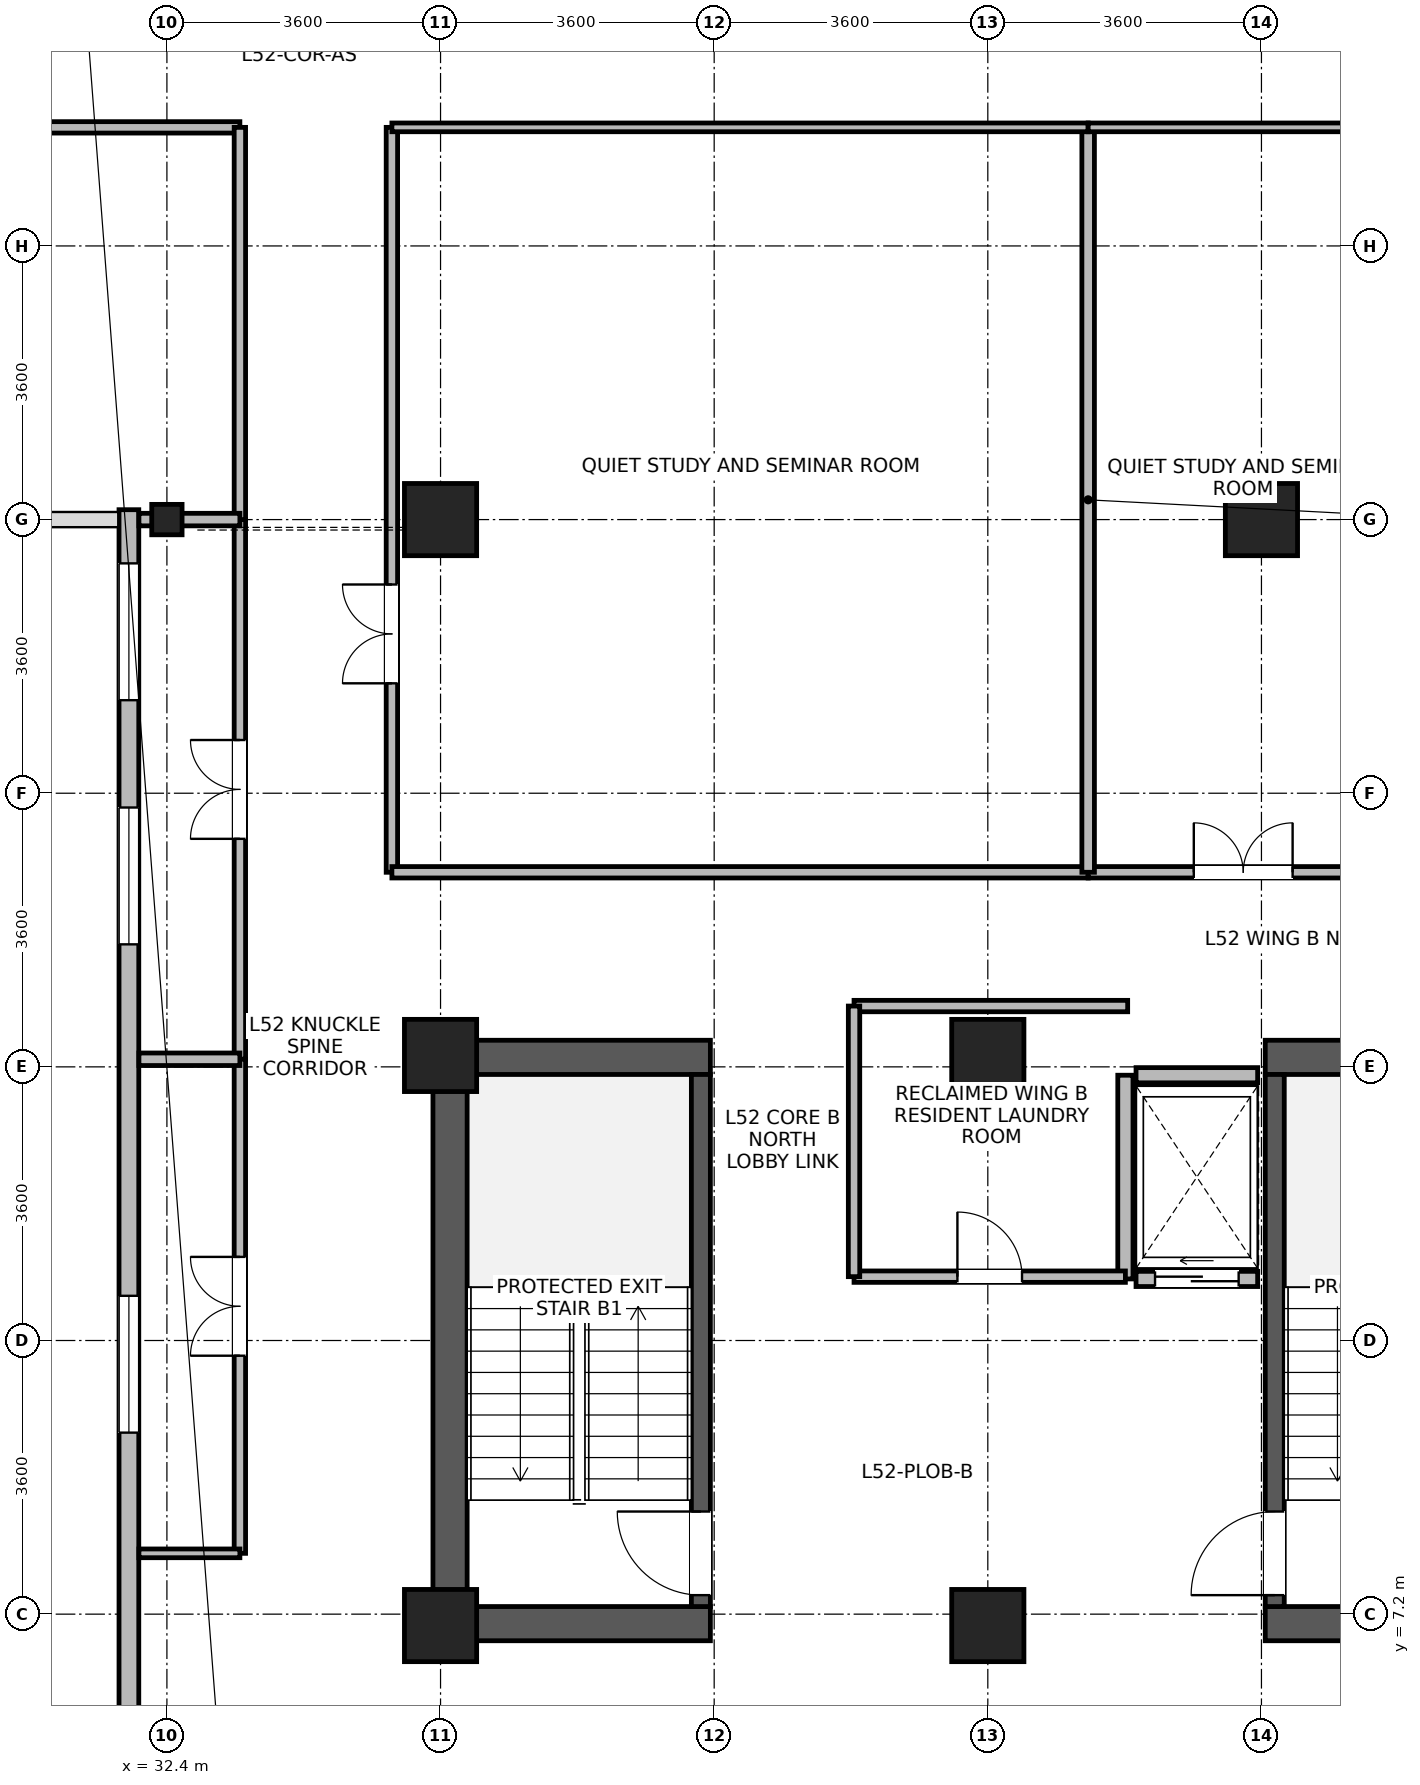
"""IFC4 building model, lengths in metres.
Left out: names, types, materials, properties, quantities, classifications, styles, units other than length and angle.
Written with IfcOpenShell. Run it as: python <this file> out.ifc"""

import sys

from ifc_helpers import new_model, si_unit, direction, frame, frame_2d, origin, origin_2d, place, context, subcontext, project, spatial, rectangle, i_section, extrude, source, transform, mapped, element, fill, save


model = new_model("IFC4")
c1 = context("Model", 3, precision=1e-05, world=origin(), true_north=direction((0.0, 1.0)))
c2 = subcontext(c1, "Body", "Model", "MODEL_VIEW")
j1 = project(units=[si_unit("LENGTHUNIT", "METRE"), si_unit("PLANEANGLEUNIT", "RADIAN")], contexts=[c1])
p1 = place(None, origin())
s1 = spatial("IfcSite", under=j1, at=p1, CompositionType="ELEMENT")
p2 = place(p1, origin())
s2 = spatial("IfcBuilding", under=s1, at=p2, CompositionType="ELEMENT")
p3 = place(p2, frame((0.0, 0.0, 205.5)))
s3 = spatial("IfcBuildingStorey", under=s2, at=p3, CompositionType="ELEMENT", Elevation=205.5)
p4 = place(p3, frame((36.125, 6.85, 0.0), z_axis=(0.0, 0.0, 1.0), x_axis=(0.0, 1.0, 0.0)))
e1 = element("IfcWall", 1, at=p4, inside=s3, PredefinedType="SHEAR", context=c2, shape_type="SweptSolid", body=[
    extrude(rectangle(XDim=7.9, YDim=0.45, at=frame_2d((3.95, 0.0))), origin(), (0.0, 0.0, 1.0), 3.47),
])
for number, where, z_axis, x_axis in (
    (2, (36.35, 7.075, 0.0), (0.0, 0.0, 1.0), (1.0, 0.0, 0.0)),
    (3, (46.85, 7.075, 0.0), (0.0, 0.0, 1.0), (1.0, 0.0, 0.0)),
    (4, (36.35, 14.525, 0.0), (0.0, 0.0, 1.0), (1.0, 0.0, 0.0)),
    (5, (46.85, 14.525, 0.0), (0.0, 0.0, 1.0), (1.0, 0.0, 0.0)),
):
    element("IfcWall", number, at=place(p3, frame(where, z_axis=z_axis, x_axis=x_axis)), inside=s3, PredefinedType="SHEAR", context=c2, shape_type="SweptSolid", body=[
        extrude(rectangle(XDim=3.2, YDim=0.45, at=frame_2d((1.6, 0.0))), origin(), (0.0, 0.0, 1.0), 3.47),
    ])
p5 = place(p3, frame((39.425, 7.3, 0.0), z_axis=(0.0, 0.0, 1.0), x_axis=(0.0, 1.0, 0.0)))
e6 = element("IfcWall", 6, at=p5, inside=s3, PredefinedType="SHEAR", context=c2, shape_type="SweptSolid", body=[
    extrude(rectangle(XDim=7.0, YDim=0.25, at=frame_2d((3.5, 0.0))), origin(), (0.0, 0.0, 1.0), 3.47),
])
p6 = place(p5, frame((0.15, 0.0, 0.0)))
e7 = element("IfcOpeningElement", 7, at=p6, cuts=e6, PredefinedType="OPENING", context=c2, shape_type="SweptSolid", body=[
    extrude(rectangle(XDim=1.1, YDim=2.08, at=frame_2d((0.55, 1.04))), frame((0.0, 0.135, 0.0), z_axis=(0.0, -1.0, 0.0), x_axis=(1.0, 0.0, 0.0)), (0.0, 0.0, 1.0), 0.27),
])
p7 = place(p3, frame((46.975, 7.3, 0.0), z_axis=(0.0, 0.0, 1.0), x_axis=(0.0, 1.0, 0.0)))
e8 = element("IfcWall", 8, at=p7, inside=s3, PredefinedType="SHEAR", context=c2, shape_type="SweptSolid", body=[
    extrude(rectangle(XDim=7.0, YDim=0.25, at=frame_2d((3.5, 0.0))), origin(), (0.0, 0.0, 1.0), 3.47),
])
p8 = place(p7, frame((0.15, 0.0, 0.0)))
e9 = element("IfcOpeningElement", 9, at=p8, cuts=e8, PredefinedType="OPENING", context=c2, shape_type="SweptSolid", body=[
    extrude(rectangle(XDim=1.1, YDim=2.08, at=frame_2d((0.55, 1.04))), frame((0.0, 0.135, 0.0), z_axis=(0.0, -1.0, 0.0), x_axis=(1.0, 0.0, 0.0)), (0.0, 0.0, 1.0), 0.27),
])
m1 = source(origin(), c2, "Body", "SweptSolid", [
    extrude(rectangle(XDim=0.95, YDim=0.95, at=origin_2d()), origin(), (0.0, 0.0, 1.0), 3.7),
])
for number, where, z_axis, x_axis in (
    (10, (36.0, 21.6, 0.0), (0.0, 0.0, 1.0), (1.0, 0.0, 0.0)),
    (11, (46.8, 21.6, 0.0), (0.0, 0.0, 1.0), (1.0, 0.0, 0.0)),
    (12, (36.0, 7.05, 0.0), (0.0, 0.0, 1.0), (1.0, 0.0, 0.0)),
    (13, (36.0, 14.55, 0.0), (0.0, 0.0, 1.0), (1.0, 0.0, 0.0)),
    (14, (43.2, 7.05, 0.0), (0.0, 0.0, 1.0), (1.0, 0.0, 0.0)),
    (15, (43.2, 14.55, 0.0), (0.0, 0.0, 1.0), (1.0, 0.0, 0.0)),
):
    element("IfcColumn", number, at=place(p3, frame(where, z_axis=z_axis, x_axis=x_axis)), inside=s3, PredefinedType="COLUMN", context=c2, shape_type="MappedRepresentation", body=[
        mapped(m1, transform((0.0, 0.0, 0.0), x_axis=(1.0, 0.0, 0.0), y_axis=(0.0, 1.0, 0.0), z_axis=(0.0, 0.0, 1.0), scale=1.0)),
    ])
m2 = source(origin(), c2, "Body", "SweptSolid", [
    extrude(i_section(OverallWidth=0.399, OverallDepth=0.4, WebThickness=0.017, FlangeThickness=0.023, FilletRadius=0.015, at=origin_2d()), origin(), (0.0, 0.0, 1.0), 3.7),
])
p9 = place(p3, frame((32.4, 21.6, 0.0), z_axis=(0.0, 0.0, 1.0), x_axis=(1.0, 0.0, 0.0)))
e16 = element("IfcColumn", 16, at=p9, inside=s3, PredefinedType="COLUMN", context=c2, shape_type="MappedRepresentation", body=[
    mapped(m2, transform((0.0, 0.0, 0.0), x_axis=(1.0, 0.0, 0.0), y_axis=(0.0, 1.0, 0.0), z_axis=(0.0, 0.0, 1.0), scale=1.0)),
])
p10 = place(p3, frame((31.9, 5.67, 0.0), z_axis=(0.0, 0.0, 1.0), x_axis=(0.0, 1.0, 0.0)))
e17 = element("IfcWall", 17, at=p10, inside=s3, PredefinedType="STANDARD", context=c2, shape_type="SweptSolid", body=[
    extrude(rectangle(XDim=16.06, YDim=0.26, at=frame_2d((8.03, 0.0))), origin(), (0.0, 0.0, 1.0), 3.45),
])
p11 = place(p10, frame((3.918, 0.0, 0.85)))
e18 = element("IfcOpeningElement", 18, at=p11, cuts=e17, PredefinedType="OPENING", context=c2, shape_type="SweptSolid", body=[
    extrude(rectangle(XDim=1.8, YDim=1.85, at=frame_2d((0.9, 0.925))), frame((0.0, 0.14, 0.0), z_axis=(0.0, -1.0, 0.0), x_axis=(1.0, 0.0, 0.0)), (0.0, 0.0, 1.0), 0.28),
])
p12 = place(p10, frame((10.342, 0.0, 0.85)))
e19 = element("IfcOpeningElement", 19, at=p12, cuts=e17, PredefinedType="OPENING", context=c2, shape_type="SweptSolid", body=[
    extrude(rectangle(XDim=1.8, YDim=1.85, at=frame_2d((0.9, 0.925))), frame((0.0, 0.14, 0.0), z_axis=(0.0, -1.0, 0.0), x_axis=(1.0, 0.0, 0.0)), (0.0, 0.0, 1.0), 0.28),
])
p13 = place(p10, frame((13.554, 0.0, 0.85)))
e20 = element("IfcOpeningElement", 20, at=p13, cuts=e17, PredefinedType="OPENING", context=c2, shape_type="SweptSolid", body=[
    extrude(rectangle(XDim=1.8, YDim=1.85, at=frame_2d((0.9, 0.925))), frame((0.0, 0.14, 0.0), z_axis=(0.0, -1.0, 0.0), x_axis=(1.0, 0.0, 0.0)), (0.0, 0.0, 1.0), 0.28),
])
p14 = place(p3, frame((45.15, 11.61, 0.0), z_axis=(0.0, 0.0, 1.0), x_axis=(1.0, 0.0, 0.0)))
e21 = element("IfcWall", 21, at=p14, inside=s3, PredefinedType="PARTITIONING", context=c2, shape_type="SweptSolid", body=[
    extrude(rectangle(XDim=1.6, YDim=0.2, at=frame_2d((0.8, 0.0))), origin(), (0.0, 0.0, 1.0), 3.45),
])
p15 = place(p14, frame((0.25, 0.0, 0.0)))
e22 = element("IfcOpeningElement", 22, at=p15, cuts=e21, PredefinedType="OPENING", context=c2, shape_type="SweptSolid", body=[
    extrude(rectangle(XDim=1.1, YDim=2.12, at=frame_2d((0.55, 1.06))), frame((0.0, 0.11, 0.0), z_axis=(0.0, -1.0, 0.0), x_axis=(1.0, 0.0, 0.0)), (0.0, 0.0, 1.0), 0.22),
])
p16 = place(p3, frame((45.15, 14.29, 0.0), z_axis=(0.0, 0.0, 1.0), x_axis=(1.0, 0.0, 0.0)))
e23 = element("IfcWall", 23, at=p16, inside=s3, PredefinedType="PARTITIONING", context=c2, shape_type="SweptSolid", body=[
    extrude(rectangle(XDim=1.6, YDim=0.2, at=frame_2d((0.8, 0.0))), origin(), (0.0, 0.0, 1.0), 2.45),
])
p17 = place(p3, frame((45.01, 11.61, 0.0), z_axis=(0.0, 0.0, 1.0), x_axis=(0.0, 1.0, 0.0)))
e24 = element("IfcWall", 24, at=p17, inside=s3, PredefinedType="PARTITIONING", context=c2, shape_type="SweptSolid", body=[
    extrude(rectangle(XDim=2.68, YDim=0.2, at=frame_2d((1.34, 0.0))), origin(), (0.0, 0.0, 1.0), 3.45),
])
p18 = place(p3, frame((35.36, 16.96, 0.0), z_axis=(0.0, 0.0, 1.0), x_axis=(0.0, 1.0, 0.0)))
e25 = element("IfcWall", 25, at=p18, inside=s3, PredefinedType="PARTITIONING", context=c2, shape_type="SweptSolid", body=[
    extrude(rectangle(XDim=9.8, YDim=0.15, at=frame_2d((4.9, 0.0))), origin(), (0.0, 0.0, 1.0), 3.45),
])
p19 = place(p18, frame((2.486, 0.0, 0.0)))
e26 = element("IfcOpeningElement", 26, at=p19, cuts=e25, PredefinedType="OPENING", context=c2, shape_type="SweptSolid", body=[
    extrude(rectangle(XDim=1.3, YDim=2.12, at=frame_2d((0.65, 1.06))), frame((0.0, 0.085, 0.0), z_axis=(0.0, -1.0, 0.0), x_axis=(1.0, 0.0, 0.0)), (0.0, 0.0, 1.0), 0.17),
])
p20 = place(p3, frame((24.04, 26.76, 0.0), z_axis=(0.0, 0.0, 1.0), x_axis=(1.0, 0.0, 0.0)))
e27 = element("IfcWall", 27, at=p20, inside=s3, PredefinedType="PARTITIONING", context=c2, shape_type="SweptSolid", body=[
    extrude(rectangle(XDim=9.32, YDim=0.15, at=frame_2d((4.66, 0.0))), origin(), (0.0, 0.0, 1.0), 3.45),
])
p21 = place(p20, frame((4.01, 0.0, 0.0)))
e28 = element("IfcOpeningElement", 28, at=p21, cuts=e27, PredefinedType="OPENING", context=c2, shape_type="SweptSolid", body=[
    extrude(rectangle(XDim=1.3, YDim=2.12, at=frame_2d((0.65, 1.06))), frame((0.0, 0.085, 0.0), z_axis=(0.0, -1.0, 0.0), x_axis=(1.0, 0.0, 0.0)), (0.0, 0.0, 1.0), 0.17),
])
p22 = place(p3, frame((35.36, 16.96, 0.0), z_axis=(0.0, 0.0, 1.0), x_axis=(1.0, 0.0, 0.0)))
e29 = element("IfcWall", 29, at=p22, inside=s3, PredefinedType="PARTITIONING", context=c2, shape_type="SweptSolid", body=[
    extrude(rectangle(XDim=9.16, YDim=0.15, at=frame_2d((4.58, 0.0))), origin(), (0.0, 0.0, 1.0), 3.45),
])
p23 = place(p3, frame((33.36, 14.5, 0.0), z_axis=(0.0, 0.0, 1.0), x_axis=(0.0, 1.0, 0.0)))
e30 = element("IfcWall", 30, at=p23, inside=s3, PredefinedType="PARTITIONING", context=c2, shape_type="SweptSolid", body=[
    extrude(rectangle(XDim=7.1, YDim=0.15, at=frame_2d((3.55, 0.0))), origin(), (0.0, 0.0, 1.0), 3.45),
])
p24 = place(p23, frame((2.9, 0.0, 0.0)))
e31 = element("IfcOpeningElement", 31, at=p24, cuts=e30, PredefinedType="OPENING", context=c2, shape_type="SweptSolid", body=[
    extrude(rectangle(XDim=1.3, YDim=2.12, at=frame_2d((0.65, 1.06))), frame((0.0, 0.085, 0.0), z_axis=(0.0, -1.0, 0.0), x_axis=(1.0, 0.0, 0.0)), (0.0, 0.0, 1.0), 0.17),
])
p25 = place(p3, frame((33.36, 8.0, 0.0), z_axis=(0.0, 0.0, 1.0), x_axis=(0.0, 1.0, 0.0)))
e32 = element("IfcWall", 32, at=p25, inside=s3, PredefinedType="PARTITIONING", context=c2, shape_type="SweptSolid", body=[
    extrude(rectangle(XDim=6.5, YDim=0.15, at=frame_2d((3.25, 0.0))), origin(), (0.0, 0.0, 1.0), 3.45),
])
p26 = place(p25, frame((2.6, 0.0, 0.0)))
e33 = element("IfcOpeningElement", 33, at=p26, cuts=e32, PredefinedType="OPENING", context=c2, shape_type="SweptSolid", body=[
    extrude(rectangle(XDim=1.3, YDim=2.12, at=frame_2d((0.65, 1.06))), frame((0.0, 0.085, 0.0), z_axis=(0.0, -1.0, 0.0), x_axis=(1.0, 0.0, 0.0)), (0.0, 0.0, 1.0), 0.17),
])
p27 = place(p3, frame((33.36, 21.6, 0.0), z_axis=(0.0, 0.0, 1.0), x_axis=(0.0, 1.0, 0.0)))
e34 = element("IfcWall", 34, at=p27, inside=s3, PredefinedType="PARTITIONING", context=c2, shape_type="SweptSolid", body=[
    extrude(rectangle(XDim=5.16, YDim=0.15, at=frame_2d((2.58, 0.0))), origin(), (0.0, 0.0, 1.0), 3.45),
])
p28 = place(p3, frame((44.52, 16.96, 0.0), z_axis=(0.0, 0.0, 1.0), x_axis=(1.0, 0.0, 0.0)))
e35 = element("IfcWall", 35, at=p28, inside=s3, PredefinedType="PARTITIONING", context=c2, shape_type="SweptSolid", body=[
    extrude(rectangle(XDim=4.08, YDim=0.15, at=frame_2d((2.04, 0.0))), origin(), (0.0, 0.0, 1.0), 3.45),
])
p29 = place(p28, frame((1.39, 0.0, 0.0)))
e36 = element("IfcOpeningElement", 36, at=p29, cuts=e35, PredefinedType="OPENING", context=c2, shape_type="SweptSolid", body=[
    extrude(rectangle(XDim=1.3, YDim=2.12, at=frame_2d((0.65, 1.06))), frame((0.0, 0.085, 0.0), z_axis=(0.0, -1.0, 0.0), x_axis=(1.0, 0.0, 0.0)), (0.0, 0.0, 1.0), 0.17),
])
p30 = place(p3, frame((41.44, 11.64, 0.0), z_axis=(0.0, 0.0, 1.0), x_axis=(1.0, 0.0, 0.0)))
e37 = element("IfcWall", 37, at=p30, inside=s3, PredefinedType="PARTITIONING", context=c2, shape_type="SweptSolid", body=[
    extrude(rectangle(XDim=3.57, YDim=0.15, at=frame_2d((1.785, 0.0))), origin(), (0.0, 0.0, 1.0), 3.45),
])
p31 = place(p30, frame((1.36, 0.0, 0.0)))
e38 = element("IfcOpeningElement", 38, at=p31, cuts=e37, PredefinedType="OPENING", context=c2, shape_type="SweptSolid", body=[
    extrude(rectangle(XDim=0.85, YDim=2.04, at=frame_2d((0.425, 1.02))), frame((0.0, 0.085, 0.0), z_axis=(0.0, -1.0, 0.0), x_axis=(1.0, 0.0, 0.0)), (0.0, 0.0, 1.0), 0.17),
])
p32 = place(p3, frame((41.44, 15.2, 0.0), z_axis=(0.0, 0.0, 1.0), x_axis=(1.0, 0.0, 0.0)))
e39 = element("IfcWall", 39, at=p32, inside=s3, PredefinedType="PARTITIONING", context=c2, shape_type="SweptSolid", body=[
    extrude(rectangle(XDim=3.6, YDim=0.15, at=frame_2d((1.8, 0.0))), origin(), (0.0, 0.0, 1.0), 3.45),
])
p33 = place(p3, frame((41.44, 11.64, 0.0), z_axis=(0.0, 0.0, 1.0), x_axis=(0.0, 1.0, 0.0)))
e40 = element("IfcWall", 40, at=p33, inside=s3, PredefinedType="PARTITIONING", context=c2, shape_type="SweptSolid", body=[
    extrude(rectangle(XDim=3.56, YDim=0.15, at=frame_2d((1.78, 0.0))), origin(), (0.0, 0.0, 1.0), 3.45),
])
p34 = place(p3, frame((44.52, 16.96, 0.0), z_axis=(0.0, 0.0, 1.0), x_axis=(0.0, 1.0, 0.0)))
e41 = element("IfcWall", 41, at=p34, inside=s3, PredefinedType="PARTITIONING", context=c2, shape_type="SweptSolid", body=[
    extrude(rectangle(XDim=9.8, YDim=0.165, at=frame_2d((4.9, 0.0))), origin(), (0.0, 0.0, 1.0), 3.45),
])
p35 = place(p3, frame((35.36, 26.76, 0.0), z_axis=(0.0, 0.0, 1.0), x_axis=(1.0, 0.0, 0.0)))
e42 = element("IfcWall", 42, at=p35, inside=s3, PredefinedType="PARTITIONING", context=c2, shape_type="SweptSolid", body=[
    extrude(rectangle(XDim=9.16, YDim=0.115, at=frame_2d((4.58, 0.0))), origin(), (0.0, 0.0, 1.0), 3.45),
])
p36 = place(p3, frame((44.52, 26.76, 0.0), z_axis=(0.0, 0.0, 1.0), x_axis=(1.0, 0.0, 0.0)))
e43 = element("IfcWall", 43, at=p36, inside=s3, PredefinedType="PARTITIONING", context=c2, shape_type="SweptSolid", body=[
    extrude(rectangle(XDim=4.08, YDim=0.115, at=frame_2d((2.04, 0.0))), origin(), (0.0, 0.0, 1.0), 3.45),
])
p37 = place(p3, frame((32.032, 8.0, 0.0), z_axis=(0.0, 0.0, 1.0), x_axis=(1.0, 0.0, 0.0)))
e44 = element("IfcWall", 44, at=p37, inside=s3, PredefinedType="PARTITIONING", context=c2, shape_type="SweptSolid", body=[
    extrude(rectangle(XDim=1.328, YDim=0.115, at=frame_2d((0.664, 0.0))), origin(), (0.0, 0.0, 1.0), 3.45),
])
p38 = place(p3, frame((32.032, 14.5, 0.0), z_axis=(0.0, 0.0, 1.0), x_axis=(1.0, 0.0, 0.0)))
e45 = element("IfcWall", 45, at=p38, inside=s3, PredefinedType="PARTITIONING", context=c2, shape_type="SweptSolid", body=[
    extrude(rectangle(XDim=1.328, YDim=0.165, at=frame_2d((0.664, 0.0))), origin(), (0.0, 0.0, 1.0), 3.45),
])
p39 = place(p3, frame((32.032, 21.6, 0.0), z_axis=(0.0, 0.0, 1.0), x_axis=(1.0, 0.0, 0.0)))
e46 = element("IfcWall", 46, at=p39, inside=s3, PredefinedType="PARTITIONING", context=c2, shape_type="SweptSolid", body=[
    extrude(rectangle(XDim=1.328, YDim=0.165, at=frame_2d((0.664, 0.0))), origin(), (0.0, 0.0, 1.0), 3.0),
])
p40 = place(p11, origin())
e47 = element("IfcWindow", 47, at=p40, inside=s3, PartitioningType="SINGLE_PANEL", PredefinedType="WINDOW", context=c2, shape_type="SweptSolid", body=[
    extrude(rectangle(XDim=1.8, YDim=1.85, at=frame_2d((0.9, 0.925))), frame((0.0, 0.03, 0.0), z_axis=(0.0, -1.0, 0.0), x_axis=(1.0, 0.0, 0.0)), (0.0, 0.0, 1.0), 0.06),
])
fill(e18, e47)
p41 = place(p12, origin())
e48 = element("IfcWindow", 48, at=p41, inside=s3, PartitioningType="SINGLE_PANEL", PredefinedType="WINDOW", context=c2, shape_type="SweptSolid", body=[
    extrude(rectangle(XDim=1.8, YDim=1.85, at=frame_2d((0.9, 0.925))), frame((0.0, 0.03, 0.0), z_axis=(0.0, -1.0, 0.0), x_axis=(1.0, 0.0, 0.0)), (0.0, 0.0, 1.0), 0.06),
])
fill(e19, e48)
p42 = place(p13, origin())
e49 = element("IfcWindow", 49, at=p42, inside=s3, PartitioningType="SINGLE_PANEL", PredefinedType="WINDOW", context=c2, shape_type="SweptSolid", body=[
    extrude(rectangle(XDim=1.8, YDim=1.85, at=frame_2d((0.9, 0.925))), frame((0.0, 0.03, 0.0), z_axis=(0.0, -1.0, 0.0), x_axis=(1.0, 0.0, 0.0)), (0.0, 0.0, 1.0), 0.06),
])
fill(e20, e49)
p43 = place(p6, origin())
e50 = element("IfcDoor", 50, at=p43, inside=s3, OperationType="SINGLE_SWING_RIGHT", PredefinedType="DOOR", context=c2, shape_type="SweptSolid", body=[
    extrude(rectangle(XDim=1.1, YDim=2.08, at=frame_2d((0.55, 1.04))), frame((0.0, 0.025, 0.0), z_axis=(0.0, -1.0, 0.0), x_axis=(1.0, 0.0, 0.0)), (0.0, 0.0, 1.0), 0.05),
])
fill(e7, e50)
p44 = place(p8, origin())
e51 = element("IfcDoor", 51, at=p44, inside=s3, OperationType="SINGLE_SWING_LEFT", PredefinedType="DOOR", context=c2, shape_type="SweptSolid", body=[
    extrude(rectangle(XDim=1.1, YDim=2.08, at=frame_2d((0.55, 1.04))), frame((0.0, 0.025, 0.0), z_axis=(0.0, -1.0, 0.0), x_axis=(1.0, 0.0, 0.0)), (0.0, 0.0, 1.0), 0.05),
])
fill(e9, e51)
p45 = place(p15, origin())
e52 = element("IfcDoor", 52, at=p45, inside=s3, OperationType="SLIDING_TO_LEFT", PredefinedType="DOOR", context=c2, shape_type="SweptSolid", body=[
    extrude(rectangle(XDim=1.1, YDim=2.12, at=frame_2d((0.55, 1.06))), frame((0.0, 0.025, 0.0), z_axis=(0.0, -1.0, 0.0), x_axis=(1.0, 0.0, 0.0)), (0.0, 0.0, 1.0), 0.05),
])
fill(e22, e52)
p46 = place(p19, origin())
e53 = element("IfcDoor", 53, at=p46, inside=s3, OperationType="DOUBLE_DOOR_SINGLE_SWING", PredefinedType="DOOR", context=c2, shape_type="SweptSolid", body=[
    extrude(rectangle(XDim=1.3, YDim=2.12, at=frame_2d((0.65, 1.06))), frame((0.0, 0.025, 0.0), z_axis=(0.0, -1.0, 0.0), x_axis=(1.0, 0.0, 0.0)), (0.0, 0.0, 1.0), 0.05),
])
fill(e26, e53)
p47 = place(p24, origin())
e54 = element("IfcDoor", 54, at=p47, inside=s3, OperationType="DOUBLE_DOOR_SINGLE_SWING", PredefinedType="DOOR", context=c2, shape_type="SweptSolid", body=[
    extrude(rectangle(XDim=1.3, YDim=2.12, at=frame_2d((0.65, 1.06))), frame((0.0, 0.025, 0.0), z_axis=(0.0, -1.0, 0.0), x_axis=(1.0, 0.0, 0.0)), (0.0, 0.0, 1.0), 0.05),
])
fill(e31, e54)
p48 = place(p26, origin())
e55 = element("IfcDoor", 55, at=p48, inside=s3, OperationType="DOUBLE_DOOR_SINGLE_SWING", PredefinedType="DOOR", context=c2, shape_type="SweptSolid", body=[
    extrude(rectangle(XDim=1.3, YDim=2.12, at=frame_2d((0.65, 1.06))), frame((0.0, 0.025, 0.0), z_axis=(0.0, -1.0, 0.0), x_axis=(1.0, 0.0, 0.0)), (0.0, 0.0, 1.0), 0.05),
])
fill(e33, e55)
p49 = place(p29, origin())
e56 = element("IfcDoor", 56, at=p49, inside=s3, OperationType="DOUBLE_DOOR_SINGLE_SWING", PredefinedType="DOOR", context=c2, shape_type="SweptSolid", body=[
    extrude(rectangle(XDim=1.3, YDim=2.12, at=frame_2d((0.65, 1.06))), frame((0.0, 0.025, 0.0), z_axis=(0.0, -1.0, 0.0), x_axis=(1.0, 0.0, 0.0)), (0.0, 0.0, 1.0), 0.05),
])
fill(e36, e56)
p50 = place(p31, origin())
e57 = element("IfcDoor", 57, at=p50, inside=s3, OperationType="SINGLE_SWING_LEFT", PredefinedType="DOOR", context=c2, shape_type="SweptSolid", body=[
    extrude(rectangle(XDim=0.85, YDim=2.04, at=frame_2d((0.425, 1.02))), frame((0.0, 0.025, 0.0), z_axis=(0.0, -1.0, 0.0), x_axis=(1.0, 0.0, 0.0)), (0.0, 0.0, 1.0), 0.05),
])
fill(e38, e57)
save(model, sys.argv[1])
